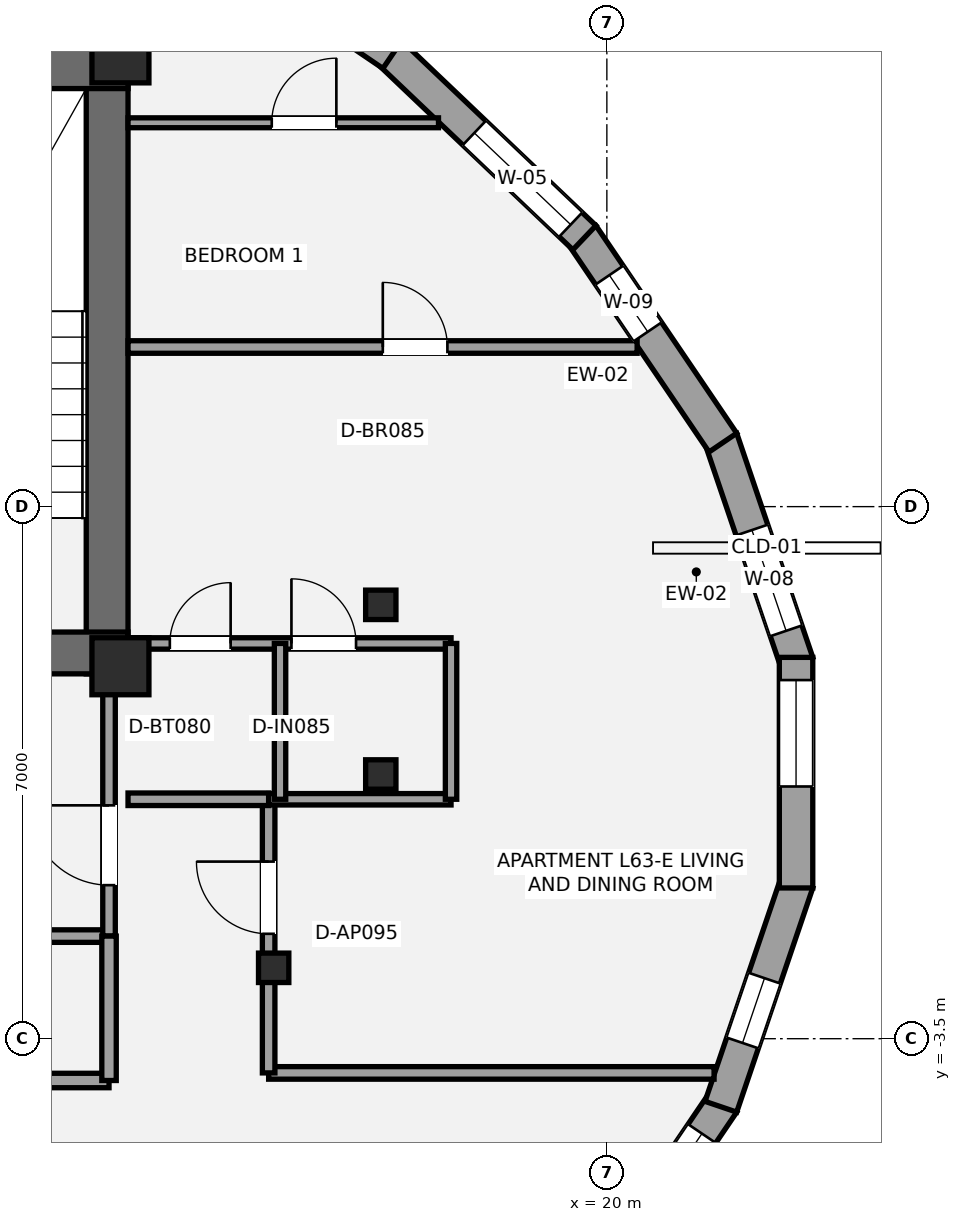
"""IFC4 building model, lengths in metres.
Left out: names, types, materials, properties, quantities, classifications, styles, units other than length and angle.
Written with IfcOpenShell. Run it as: python <this file> out.ifc"""

import sys

from ifc_helpers import new_model, si_unit, direction, frame, frame_2d, origin, origin_2d, place, context, subcontext, project, spatial, rectangle, i_section, extrude, element, fill, save


model = new_model("IFC4")
c1 = context("Model", 3, precision=1e-05, world=origin(), true_north=direction((0.0, 1.0)))
c2 = subcontext(c1, "Body", "Model", "MODEL_VIEW")
j1 = project(units=[si_unit("LENGTHUNIT", "METRE"), si_unit("PLANEANGLEUNIT", "RADIAN")], contexts=[c1])
p1 = place(None, origin())
s1 = spatial("IfcSite", under=j1, at=p1, CompositionType="ELEMENT")
p2 = place(p1, origin())
s2 = spatial("IfcBuilding", under=s1, at=p2, CompositionType="ELEMENT")
p3 = place(p2, frame((0.0, 0.0, 225.75)))
s3 = spatial("IfcBuildingStorey", under=s2, at=p3, CompositionType="ELEMENT", Elevation=225.75)
p4 = place(p3, frame((13.425, 1.3, 0.0), z_axis=(0.0, 0.0, 1.0), x_axis=(0.0, 1.0, 0.0)))
e1 = element("IfcWall", 1, at=p4, inside=s3, PredefinedType="SHEAR", context=c2, shape_type="SweptSolid", body=[
    extrude(rectangle(XDim=8.25, YDim=0.55, at=frame_2d((4.125, 0.0))), origin(), (0.0, 0.0, 1.0), 3.15),
])
p5 = place(p3, frame((4.525, 9.275, 0.0), z_axis=(0.0, 0.0, 1.0), x_axis=(1.0, 0.0, 0.0)))
e2 = element("IfcWall", 2, at=p5, inside=s3, PredefinedType="SHEAR", context=c2, shape_type="SweptSolid", body=[
    extrude(rectangle(XDim=9.175, YDim=0.55, at=frame_2d((4.587, 0.0))), origin(), (0.0, 0.0, 1.0), 3.15),
])
p6 = place(p3, frame((13.7, 1.575, 0.0), z_axis=(0.0, 0.0, 1.0), x_axis=(-1.0, 0.0, 0.0)))
e3 = element("IfcWall", 3, at=p6, inside=s3, PredefinedType="SHEAR", context=c2, shape_type="SweptSolid", body=[
    extrude(rectangle(XDim=8.775, YDim=0.55, at=frame_2d((4.387, 0.0))), origin(), (0.0, 0.0, 1.0), 3.15),
])
p7 = place(p6, frame((2.35, 0.0, 0.0)))
e4 = element("IfcOpeningElement", 4, at=p7, cuts=e3, PredefinedType="OPENING", context=c2, shape_type="SweptSolid", body=[
    extrude(rectangle(XDim=1.05, YDim=2.15, at=frame_2d((0.525, 1.075))), frame((0.0, 0.285, 0.0), z_axis=(0.0, -1.0, 0.0), x_axis=(1.0, 0.0, 0.0)), (0.0, 0.0, 1.0), 0.57),
])
p8 = place(p6, frame((4.35, 0.0, 0.0)))
e5 = element("IfcOpeningElement", 5, at=p8, cuts=e3, PredefinedType="OPENING", context=c2, shape_type="SweptSolid", body=[
    extrude(rectangle(XDim=1.1, YDim=2.2, at=frame_2d((0.55, 1.1))), frame((0.0, 0.285, 0.0), z_axis=(0.0, -1.0, 0.0), x_axis=(1.0, 0.0, 0.0)), (0.0, 0.0, 1.0), 0.57),
])
for number, where, z_axis, x_axis in (
    (6, (13.6, 1.4, 0.0), (0.0, 0.0, 1.0), (1.0, 0.0, 0.0)),
    (7, (13.6, 9.45, 0.0), (0.0, 0.0, 1.0), (1.0, 0.0, 0.0)),
):
    element("IfcColumn", number, at=place(p3, frame(where, z_axis=z_axis, x_axis=x_axis)), inside=s3, PredefinedType="PILASTER", context=c2, shape_type="SweptSolid", body=[
        extrude(rectangle(XDim=0.75, YDim=0.75, at=origin_2d()), origin(), (0.0, 0.0, 1.0), 3.15),
    ])
for number, where, z_axis, x_axis in (
    (8, (17.026, 2.208, 0.0), (0.0, 0.0, 1.0), (1.0, 0.0, 0.0)),
    (9, (15.616, -2.567, 0.0), (0.0, 0.0, 1.0), (1.0, 0.0, 0.0)),
    (10, (17.026, -0.024, 0.0), (0.0, 0.0, 1.0), (1.0, 0.0, 0.0)),
):
    element("IfcColumn", number, at=place(p3, frame(where, z_axis=z_axis, x_axis=x_axis)), inside=s3, PredefinedType="COLUMN", context=c2, shape_type="SweptSolid", body=[
        extrude(i_section(OverallWidth=0.399, OverallDepth=0.387, WebThickness=0.021, FlangeThickness=0.033, at=origin_2d()), origin(), (0.0, 0.0, 1.0), 3.15),
    ])
p9 = place(p3, frame((21.5, 4.395, 0.0), z_axis=(0.0, 0.0, 1.0), x_axis=(0.32132647272, -0.946968477791, 0.0)))
e11 = element("IfcWall", 11, at=p9, inside=s3, PredefinedType="STANDARD", context=c2, shape_type="SweptSolid", body=[
    extrude(rectangle(XDim=3.114, YDim=0.44, at=frame_2d((1.557, 0.0))), origin(), (0.0, 0.0, 1.0), 2.336),
])
p10 = place(p9, frame((1.271, 0.0, 0.55)))
e12 = element("IfcOpeningElement", 12, at=p10, cuts=e11, PredefinedType="OPENING", context=c2, shape_type="SweptSolid", body=[
    extrude(rectangle(XDim=1.4, YDim=1.55, at=frame_2d((0.7, 0.775))), frame((0.0, 0.23, 0.0), z_axis=(0.0, -1.0, 0.0), x_axis=(1.0, 0.0, 0.0)), (0.0, 0.0, 1.0), 0.46),
])
p11 = place(p3, frame((19.674, 7.074, 0.0), z_axis=(0.0, 0.0, 1.0), x_axis=(0.561186647073, -0.827689281764, 0.0)))
e13 = element("IfcWall", 13, at=p11, inside=s3, PredefinedType="STANDARD", context=c2, shape_type="SweptSolid", body=[
    extrude(rectangle(XDim=3.301, YDim=0.44, at=frame_2d((1.65, 0.0))), origin(), (0.0, 0.0, 1.0), 2.336),
])
p12 = place(p11, frame((0.639, 0.0, 0.58)))
e14 = element("IfcOpeningElement", 14, at=p12, cuts=e13, PredefinedType="OPENING", context=c2, shape_type="SweptSolid", body=[
    extrude(rectangle(XDim=0.9, YDim=1.35, at=frame_2d((0.45, 0.675))), frame((0.0, 0.23, 0.0), z_axis=(0.0, -1.0, 0.0), x_axis=(1.0, 0.0, 0.0)), (0.0, 0.0, 1.0), 0.46),
])
p13 = place(p3, frame((17.149, 9.469, 0.0), z_axis=(0.0, 0.0, 1.0), x_axis=(0.724503260132, -0.689271373306, 0.0)))
e15 = element("IfcWall", 15, at=p13, inside=s3, PredefinedType="STANDARD", context=c2, shape_type="SweptSolid", body=[
    extrude(rectangle(XDim=3.527, YDim=0.44, at=frame_2d((1.764, 0.0))), origin(), (0.0, 0.0, 1.0), 2.336),
])
p14 = place(p13, frame((1.528, 0.0, 0.55)))
e16 = element("IfcOpeningElement", 16, at=p14, cuts=e15, PredefinedType="OPENING", context=c2, shape_type="SweptSolid", body=[
    extrude(rectangle(XDim=1.75, YDim=1.55, at=frame_2d((0.875, 0.775))), frame((0.0, 0.23, 0.0), z_axis=(0.0, -1.0, 0.0), x_axis=(1.0, 0.0, 0.0)), (0.0, 0.0, 1.0), 0.46),
])
p15 = place(p3, frame((14.075, 11.551, 0.0), z_axis=(0.0, 0.0, 1.0), x_axis=(0.827635686249, -0.561265686504, 0.0)))
e17 = element("IfcWall", 17, at=p15, inside=s3, PredefinedType="STANDARD", context=c2, shape_type="SweptSolid", body=[
    extrude(rectangle(XDim=3.749, YDim=0.44, at=frame_2d((1.875, 0.0))), origin(), (0.0, 0.0, 1.0), 2.336),
])
p16 = place(p15, frame((0.5, 0.0, 0.55)))
e18 = element("IfcOpeningElement", 18, at=p16, cuts=e17, PredefinedType="OPENING", context=c2, shape_type="SweptSolid", body=[
    extrude(rectangle(XDim=1.75, YDim=1.55, at=frame_2d((0.875, 0.775))), frame((0.0, 0.23, 0.0), z_axis=(0.0, -1.0, 0.0), x_axis=(1.0, 0.0, 0.0)), (0.0, 0.0, 1.0), 0.46),
])
p17 = place(p3, frame((21.526, -4.342, 0.0), z_axis=(0.0, 0.0, 1.0), x_axis=(-0.561186647073, -0.827689281764, 0.0)))
e19 = element("IfcWall", 19, at=p17, inside=s3, PredefinedType="STANDARD", context=c2, shape_type="SweptSolid", body=[
    extrude(rectangle(XDim=3.301, YDim=0.44, at=frame_2d((1.65, 0.0))), origin(), (0.0, 0.0, 1.0), 2.336),
])
p18 = place(p17, frame((0.49, 0.0, 0.58)))
e20 = element("IfcOpeningElement", 20, at=p18, cuts=e19, PredefinedType="OPENING", context=c2, shape_type="SweptSolid", body=[
    extrude(rectangle(XDim=1.4, YDim=1.55, at=frame_2d((0.7, 0.775))), frame((0.0, 0.23, 0.0), z_axis=(0.0, -1.0, 0.0), x_axis=(1.0, 0.0, 0.0)), (0.0, 0.0, 1.0), 0.46),
])
p19 = place(p3, frame((22.501, -1.446, 0.0), z_axis=(0.0, 0.0, 1.0), x_axis=(-0.32132647272, -0.946968477791, 0.0)))
e21 = element("IfcWall", 21, at=p19, inside=s3, PredefinedType="STANDARD", context=c2, shape_type="SweptSolid", body=[
    extrude(rectangle(XDim=3.114, YDim=0.44, at=frame_2d((1.557, 0.0))), origin(), (0.0, 0.0, 1.0), 2.336),
])
p20 = place(p19, frame((1.328, 0.0, 0.58)))
e22 = element("IfcOpeningElement", 22, at=p20, cuts=e21, PredefinedType="OPENING", context=c2, shape_type="SweptSolid", body=[
    extrude(rectangle(XDim=0.9, YDim=1.35, at=frame_2d((0.45, 0.675))), frame((0.0, 0.23, 0.0), z_axis=(0.0, -1.0, 0.0), x_axis=(1.0, 0.0, 0.0)), (0.0, 0.0, 1.0), 0.46),
])
p21 = place(p3, frame((22.489, 1.517, 0.0), z_axis=(0.0, 0.0, 1.0), x_axis=(0.0, -1.0, 0.0)))
e23 = element("IfcWall", 23, at=p21, inside=s3, PredefinedType="STANDARD", context=c2, shape_type="SweptSolid", body=[
    extrude(rectangle(XDim=3.034, YDim=0.44, at=frame_2d((1.517, 0.0))), origin(), (0.0, 0.0, 1.0), 2.336),
])
p22 = place(p21, frame((0.299, 0.0, 0.58)))
e24 = element("IfcOpeningElement", 24, at=p22, cuts=e23, PredefinedType="OPENING", context=c2, shape_type="SweptSolid", body=[
    extrude(rectangle(XDim=1.4, YDim=1.55, at=frame_2d((0.7, 0.775))), frame((0.0, 0.23, 0.0), z_axis=(0.0, -1.0, 0.0), x_axis=(1.0, 0.0, 0.0)), (0.0, 0.0, 1.0), 0.46),
])
p23 = place(p3, frame((7.2, -2.15, 0.0), z_axis=(0.0, 0.0, 1.0), x_axis=(1.0, 0.0, 0.0)))
e25 = element("IfcWall", 25, at=p23, inside=s3, PredefinedType="PARTITIONING", context=c2, shape_type="SweptSolid", body=[
    extrude(rectangle(XDim=6.25, YDim=0.165, at=frame_2d((3.125, 0.0))), origin(), (0.0, 0.0, 1.0), 2.97),
])
p24 = place(p3, frame((13.45, -2.15, 0.0), z_axis=(0.0, 0.0, 1.0), x_axis=(0.0, 1.0, 0.0)))
e26 = element("IfcWall", 26, at=p24, inside=s3, PredefinedType="PARTITIONING", context=c2, shape_type="SweptSolid", body=[
    extrude(rectangle(XDim=3.5, YDim=0.165, at=frame_2d((1.75, 0.0))), origin(), (0.0, 0.0, 1.0), 2.423),
])
p25 = place(p24, frame((0.67, 0.0, 0.0)))
e27 = element("IfcOpeningElement", 27, at=p25, cuts=e26, PredefinedType="OPENING", context=c2, shape_type="SweptSolid", body=[
    extrude(rectangle(XDim=1.05, YDim=2.15, at=frame_2d((0.525, 1.075))), frame((0.0, 0.093, 0.0), z_axis=(0.0, -1.0, 0.0), x_axis=(1.0, 0.0, 0.0)), (0.0, 0.0, 1.0), 0.185),
])
p26 = place(p3, frame((2.1, -4.05, 0.0), z_axis=(0.0, 0.0, 1.0), x_axis=(1.0, 0.0, 0.0)))
e28 = element("IfcWall", 28, at=p26, inside=s3, PredefinedType="PLUMBINGWALL", context=c2, shape_type="SweptSolid", body=[
    extrude(rectangle(XDim=11.35, YDim=0.19, at=frame_2d((5.675, 0.0))), origin(), (0.0, 0.0, 1.0), 2.357),
])
p27 = place(p26, frame((5.2, 0.0, 0.0)))
e29 = element("IfcOpeningElement", 29, at=p27, cuts=e28, PredefinedType="OPENING", context=c2, shape_type="SweptSolid", body=[
    extrude(rectangle(XDim=0.9, YDim=2.1, at=frame_2d((0.45, 1.05))), frame((0.0, 0.105, 0.0), z_axis=(0.0, -1.0, 0.0), x_axis=(1.0, 0.0, 0.0)), (0.0, 0.0, 1.0), 0.21),
])
p28 = place(p3, frame((13.45, -4.05, 0.0), z_axis=(0.0, 0.0, 1.0), x_axis=(0.0, 1.0, 0.0)))
e30 = element("IfcWall", 30, at=p28, inside=s3, PredefinedType="PLUMBINGWALL", context=c2, shape_type="SweptSolid", body=[
    extrude(rectangle(XDim=1.9, YDim=0.19, at=frame_2d((0.95, 0.0))), origin(), (0.0, 0.0, 1.0), 2.423),
])
p29 = place(p3, frame((15.55, -3.95, 0.0), z_axis=(0.0, 0.0, 1.0), x_axis=(1.0, 0.0, 0.0)))
e31 = element("IfcWall", 31, at=p29, inside=s3, PredefinedType="PARTITIONING", context=c2, shape_type="SweptSolid", body=[
    extrude(rectangle(XDim=5.86, YDim=0.165, at=frame_2d((2.93, 0.0))), origin(), (0.0, 0.0, 1.0), 2.423),
])
p30 = place(p3, frame((15.55, -3.95, 0.0), z_axis=(0.0, 0.0, 1.0), x_axis=(0.0, 1.0, 0.0)))
e32 = element("IfcWall", 32, at=p30, inside=s3, PredefinedType="PARTITIONING", context=c2, shape_type="SweptSolid", body=[
    extrude(rectangle(XDim=3.6, YDim=0.165, at=frame_2d((1.8, 0.0))), origin(), (0.0, 0.0, 1.0), 2.357),
])
p31 = place(p30, frame((1.83, 0.0, 0.0)))
e33 = element("IfcOpeningElement", 33, at=p31, cuts=e32, PredefinedType="OPENING", context=c2, shape_type="SweptSolid", body=[
    extrude(rectangle(XDim=0.95, YDim=2.15, at=frame_2d((0.475, 1.075))), frame((0.0, 0.093, 0.0), z_axis=(0.0, -1.0, 0.0), x_axis=(1.0, 0.0, 0.0)), (0.0, 0.0, 1.0), 0.185),
])
p32 = place(p3, frame((13.7, -0.35, 0.0), z_axis=(0.0, 0.0, 1.0), x_axis=(1.0, 0.0, 0.0)))
e34 = element("IfcWall", 34, at=p32, inside=s3, PredefinedType="PARTITIONING", context=c2, shape_type="SweptSolid", body=[
    extrude(rectangle(XDim=1.85, YDim=0.165, at=frame_2d((0.925, 0.0))), origin(), (0.0, 0.0, 1.0), 2.423),
])
p33 = place(p3, frame((13.7, 5.6, 0.0), z_axis=(0.0, 0.0, 1.0), x_axis=(1.0, 0.0, 0.0)))
e35 = element("IfcWall", 35, at=p33, inside=s3, PredefinedType="PARTITIONING", context=c2, shape_type="SweptSolid", body=[
    extrude(rectangle(XDim=6.698, YDim=0.165, at=frame_2d((3.349, 0.0))), origin(), (0.0, 0.0, 1.0), 2.423),
])
p34 = place(p33, frame((3.352, 0.0, 0.0)))
e36 = element("IfcOpeningElement", 36, at=p34, cuts=e35, PredefinedType="OPENING", context=c2, shape_type="SweptSolid", body=[
    extrude(rectangle(XDim=0.85, YDim=2.1, at=frame_2d((0.425, 1.05))), frame((0.0, 0.093, 0.0), z_axis=(0.0, -1.0, 0.0), x_axis=(1.0, 0.0, 0.0)), (0.0, 0.0, 1.0), 0.185),
])
p35 = place(p3, frame((13.7, 1.7, 0.0), z_axis=(0.0, 0.0, 1.0), x_axis=(1.0, 0.0, 0.0)))
e37 = element("IfcWall", 37, at=p35, inside=s3, PredefinedType="PLUMBINGWALL", context=c2, shape_type="SweptSolid", body=[
    extrude(rectangle(XDim=4.25, YDim=0.15, at=frame_2d((2.125, 0.0))), origin(), (0.0, 0.0, 1.0), 2.423),
])
p36 = place(p35, frame((0.55, 0.0, 0.0)))
e38 = element("IfcOpeningElement", 38, at=p36, cuts=e37, PredefinedType="OPENING", context=c2, shape_type="SweptSolid", body=[
    extrude(rectangle(XDim=0.8, YDim=2.1, at=frame_2d((0.4, 1.05))), frame((0.0, 0.085, 0.0), z_axis=(0.0, -1.0, 0.0), x_axis=(1.0, 0.0, 0.0)), (0.0, 0.0, 1.0), 0.17),
])
p37 = place(p35, frame((2.15, 0.0, 0.0)))
e39 = element("IfcOpeningElement", 39, at=p37, cuts=e37, PredefinedType="OPENING", context=c2, shape_type="SweptSolid", body=[
    extrude(rectangle(XDim=0.85, YDim=2.1, at=frame_2d((0.425, 1.05))), frame((0.0, 0.085, 0.0), z_axis=(0.0, -1.0, 0.0), x_axis=(1.0, 0.0, 0.0)), (0.0, 0.0, 1.0), 0.17),
])
p38 = place(p3, frame((15.55, -0.35, 0.0), z_axis=(0.0, 0.0, 1.0), x_axis=(1.0, 0.0, 0.0)))
e40 = element("IfcWall", 40, at=p38, inside=s3, PredefinedType="PLUMBINGWALL", context=c2, shape_type="SweptSolid", body=[
    extrude(rectangle(XDim=2.4, YDim=0.15, at=frame_2d((1.2, 0.0))), origin(), (0.0, 0.0, 1.0), 2.423),
])
p39 = place(p3, frame((15.7, -0.35, 0.0), z_axis=(0.0, 0.0, 1.0), x_axis=(0.0, 1.0, 0.0)))
e41 = element("IfcWall", 41, at=p39, inside=s3, PredefinedType="PLUMBINGWALL", context=c2, shape_type="SweptSolid", body=[
    extrude(rectangle(XDim=2.05, YDim=0.15, at=frame_2d((1.025, 0.0))), origin(), (0.0, 0.0, 1.0), 2.97),
])
p40 = place(p3, frame((17.95, -0.35, 0.0), z_axis=(0.0, 0.0, 1.0), x_axis=(0.0, 1.0, 0.0)))
e42 = element("IfcWall", 42, at=p40, inside=s3, PredefinedType="PLUMBINGWALL", context=c2, shape_type="SweptSolid", body=[
    extrude(rectangle(XDim=2.05, YDim=0.15, at=frame_2d((1.025, 0.0))), origin(), (0.0, 0.0, 1.0), 2.423),
])
p41 = place(p3, frame((13.7, 8.55, 0.0), z_axis=(0.0, 0.0, 1.0), x_axis=(1.0, 0.0, 0.0)))
e43 = element("IfcWall", 43, at=p41, inside=s3, PredefinedType="PARTITIONING", context=c2, shape_type="SweptSolid", body=[
    extrude(rectangle(XDim=4.085, YDim=0.13, at=frame_2d((2.042, 0.0))), origin(), (0.0, 0.0, 1.0), 2.423),
])
p42 = place(p41, frame((1.891, 0.0, 0.0)))
e44 = element("IfcOpeningElement", 44, at=p42, cuts=e43, PredefinedType="OPENING", context=c2, shape_type="SweptSolid", body=[
    extrude(rectangle(XDim=0.85, YDim=2.1, at=frame_2d((0.425, 1.05))), frame((0.0, 0.075, 0.0), z_axis=(0.0, -1.0, 0.0), x_axis=(1.0, 0.0, 0.0)), (0.0, 0.0, 1.0), 0.15),
])
p43 = place(p10, origin())
e45 = element("IfcWindow", 45, at=p43, inside=s3, PartitioningType="SINGLE_PANEL", PredefinedType="WINDOW", context=c2, shape_type="SweptSolid", body=[
    extrude(rectangle(XDim=1.4, YDim=1.55, at=frame_2d((0.7, 0.775))), frame((0.0, -0.01, 0.0), z_axis=(0.0, -1.0, 0.0), x_axis=(1.0, 0.0, 0.0)), (0.0, 0.0, 1.0), 0.06),
])
fill(e12, e45)
p44 = place(p12, origin())
e46 = element("IfcWindow", 46, at=p44, inside=s3, PartitioningType="SINGLE_PANEL", PredefinedType="WINDOW", context=c2, shape_type="SweptSolid", body=[
    extrude(rectangle(XDim=0.9, YDim=1.35, at=frame_2d((0.45, 0.675))), frame((0.0, -0.01, 0.0), z_axis=(0.0, -1.0, 0.0), x_axis=(1.0, 0.0, 0.0)), (0.0, 0.0, 1.0), 0.06),
])
fill(e14, e46)
p45 = place(p14, origin())
e47 = element("IfcWindow", 47, at=p45, inside=s3, PartitioningType="SINGLE_PANEL", PredefinedType="WINDOW", context=c2, shape_type="SweptSolid", body=[
    extrude(rectangle(XDim=1.75, YDim=1.55, at=frame_2d((0.875, 0.775))), frame((0.0, -0.01, 0.0), z_axis=(0.0, -1.0, 0.0), x_axis=(1.0, 0.0, 0.0)), (0.0, 0.0, 1.0), 0.06),
])
fill(e16, e47)
p46 = place(p18, origin())
e48 = element("IfcWindow", 48, at=p46, inside=s3, PartitioningType="SINGLE_PANEL", PredefinedType="WINDOW", context=c2, shape_type="SweptSolid", body=[
    extrude(rectangle(XDim=1.4, YDim=1.55, at=frame_2d((0.7, 0.775))), frame((0.0, -0.01, 0.0), z_axis=(0.0, -1.0, 0.0), x_axis=(1.0, 0.0, 0.0)), (0.0, 0.0, 1.0), 0.06),
])
fill(e20, e48)
p47 = place(p20, origin())
e49 = element("IfcWindow", 49, at=p47, inside=s3, PartitioningType="SINGLE_PANEL", PredefinedType="WINDOW", context=c2, shape_type="SweptSolid", body=[
    extrude(rectangle(XDim=0.9, YDim=1.35, at=frame_2d((0.45, 0.675))), frame((0.0, -0.01, 0.0), z_axis=(0.0, -1.0, 0.0), x_axis=(1.0, 0.0, 0.0)), (0.0, 0.0, 1.0), 0.06),
])
fill(e22, e49)
p48 = place(p22, origin())
e50 = element("IfcWindow", 50, at=p48, inside=s3, PartitioningType="SINGLE_PANEL", PredefinedType="WINDOW", context=c2, shape_type="SweptSolid", body=[
    extrude(rectangle(XDim=1.4, YDim=1.55, at=frame_2d((0.7, 0.775))), frame((0.0, -0.01, 0.0), z_axis=(0.0, -1.0, 0.0), x_axis=(1.0, 0.0, 0.0)), (0.0, 0.0, 1.0), 0.06),
])
fill(e24, e50)
p49 = place(p25, origin())
e51 = element("IfcDoor", 51, at=p49, inside=s3, OperationType="SINGLE_SWING_RIGHT", PredefinedType="DOOR", context=c2, shape_type="SweptSolid", body=[
    extrude(rectangle(XDim=1.05, YDim=2.15, at=frame_2d((0.525, 1.075))), frame((0.0, 0.025, 0.0), z_axis=(0.0, -1.0, 0.0), x_axis=(1.0, 0.0, 0.0)), (0.0, 0.0, 1.0), 0.05),
])
fill(e27, e51)
p50 = place(p31, origin())
e52 = element("IfcDoor", 52, at=p50, inside=s3, OperationType="SINGLE_SWING_RIGHT", PredefinedType="DOOR", context=c2, shape_type="SweptSolid", body=[
    extrude(rectangle(XDim=0.95, YDim=2.15, at=frame_2d((0.475, 1.075))), frame((0.0, 0.025, 0.0), z_axis=(0.0, -1.0, 0.0), x_axis=(1.0, 0.0, 0.0)), (0.0, 0.0, 1.0), 0.05),
])
fill(e33, e52)
p51 = place(p36, origin())
e53 = element("IfcDoor", 53, at=p51, inside=s3, OperationType="SINGLE_SWING_RIGHT", PredefinedType="DOOR", context=c2, shape_type="SweptSolid", body=[
    extrude(rectangle(XDim=0.8, YDim=2.1, at=frame_2d((0.4, 1.05))), frame((0.0, 0.025, 0.0), z_axis=(0.0, -1.0, 0.0), x_axis=(1.0, 0.0, 0.0)), (0.0, 0.0, 1.0), 0.05),
])
fill(e38, e53)
p52 = place(p37, origin())
e54 = element("IfcDoor", 54, at=p52, inside=s3, OperationType="SINGLE_SWING_LEFT", PredefinedType="DOOR", context=c2, shape_type="SweptSolid", body=[
    extrude(rectangle(XDim=0.85, YDim=2.1, at=frame_2d((0.425, 1.05))), frame((0.0, 0.025, 0.0), z_axis=(0.0, -1.0, 0.0), x_axis=(1.0, 0.0, 0.0)), (0.0, 0.0, 1.0), 0.05),
])
fill(e39, e54)
p53 = place(p34, origin())
e55 = element("IfcDoor", 55, at=p53, inside=s3, OperationType="SINGLE_SWING_LEFT", PredefinedType="DOOR", context=c2, shape_type="SweptSolid", body=[
    extrude(rectangle(XDim=0.85, YDim=2.1, at=frame_2d((0.425, 1.05))), frame((0.0, 0.025, 0.0), z_axis=(0.0, -1.0, 0.0), x_axis=(1.0, 0.0, 0.0)), (0.0, 0.0, 1.0), 0.05),
])
fill(e36, e55)
p54 = place(p42, origin())
e56 = element("IfcDoor", 56, at=p54, inside=s3, OperationType="SINGLE_SWING_RIGHT", PredefinedType="DOOR", context=c2, shape_type="SweptSolid", body=[
    extrude(rectangle(XDim=0.85, YDim=2.1, at=frame_2d((0.425, 1.05))), frame((0.0, 0.025, 0.0), z_axis=(0.0, -1.0, 0.0), x_axis=(1.0, 0.0, 0.0)), (0.0, 0.0, 1.0), 0.05),
])
fill(e44, e56)
save(model, sys.argv[1])
